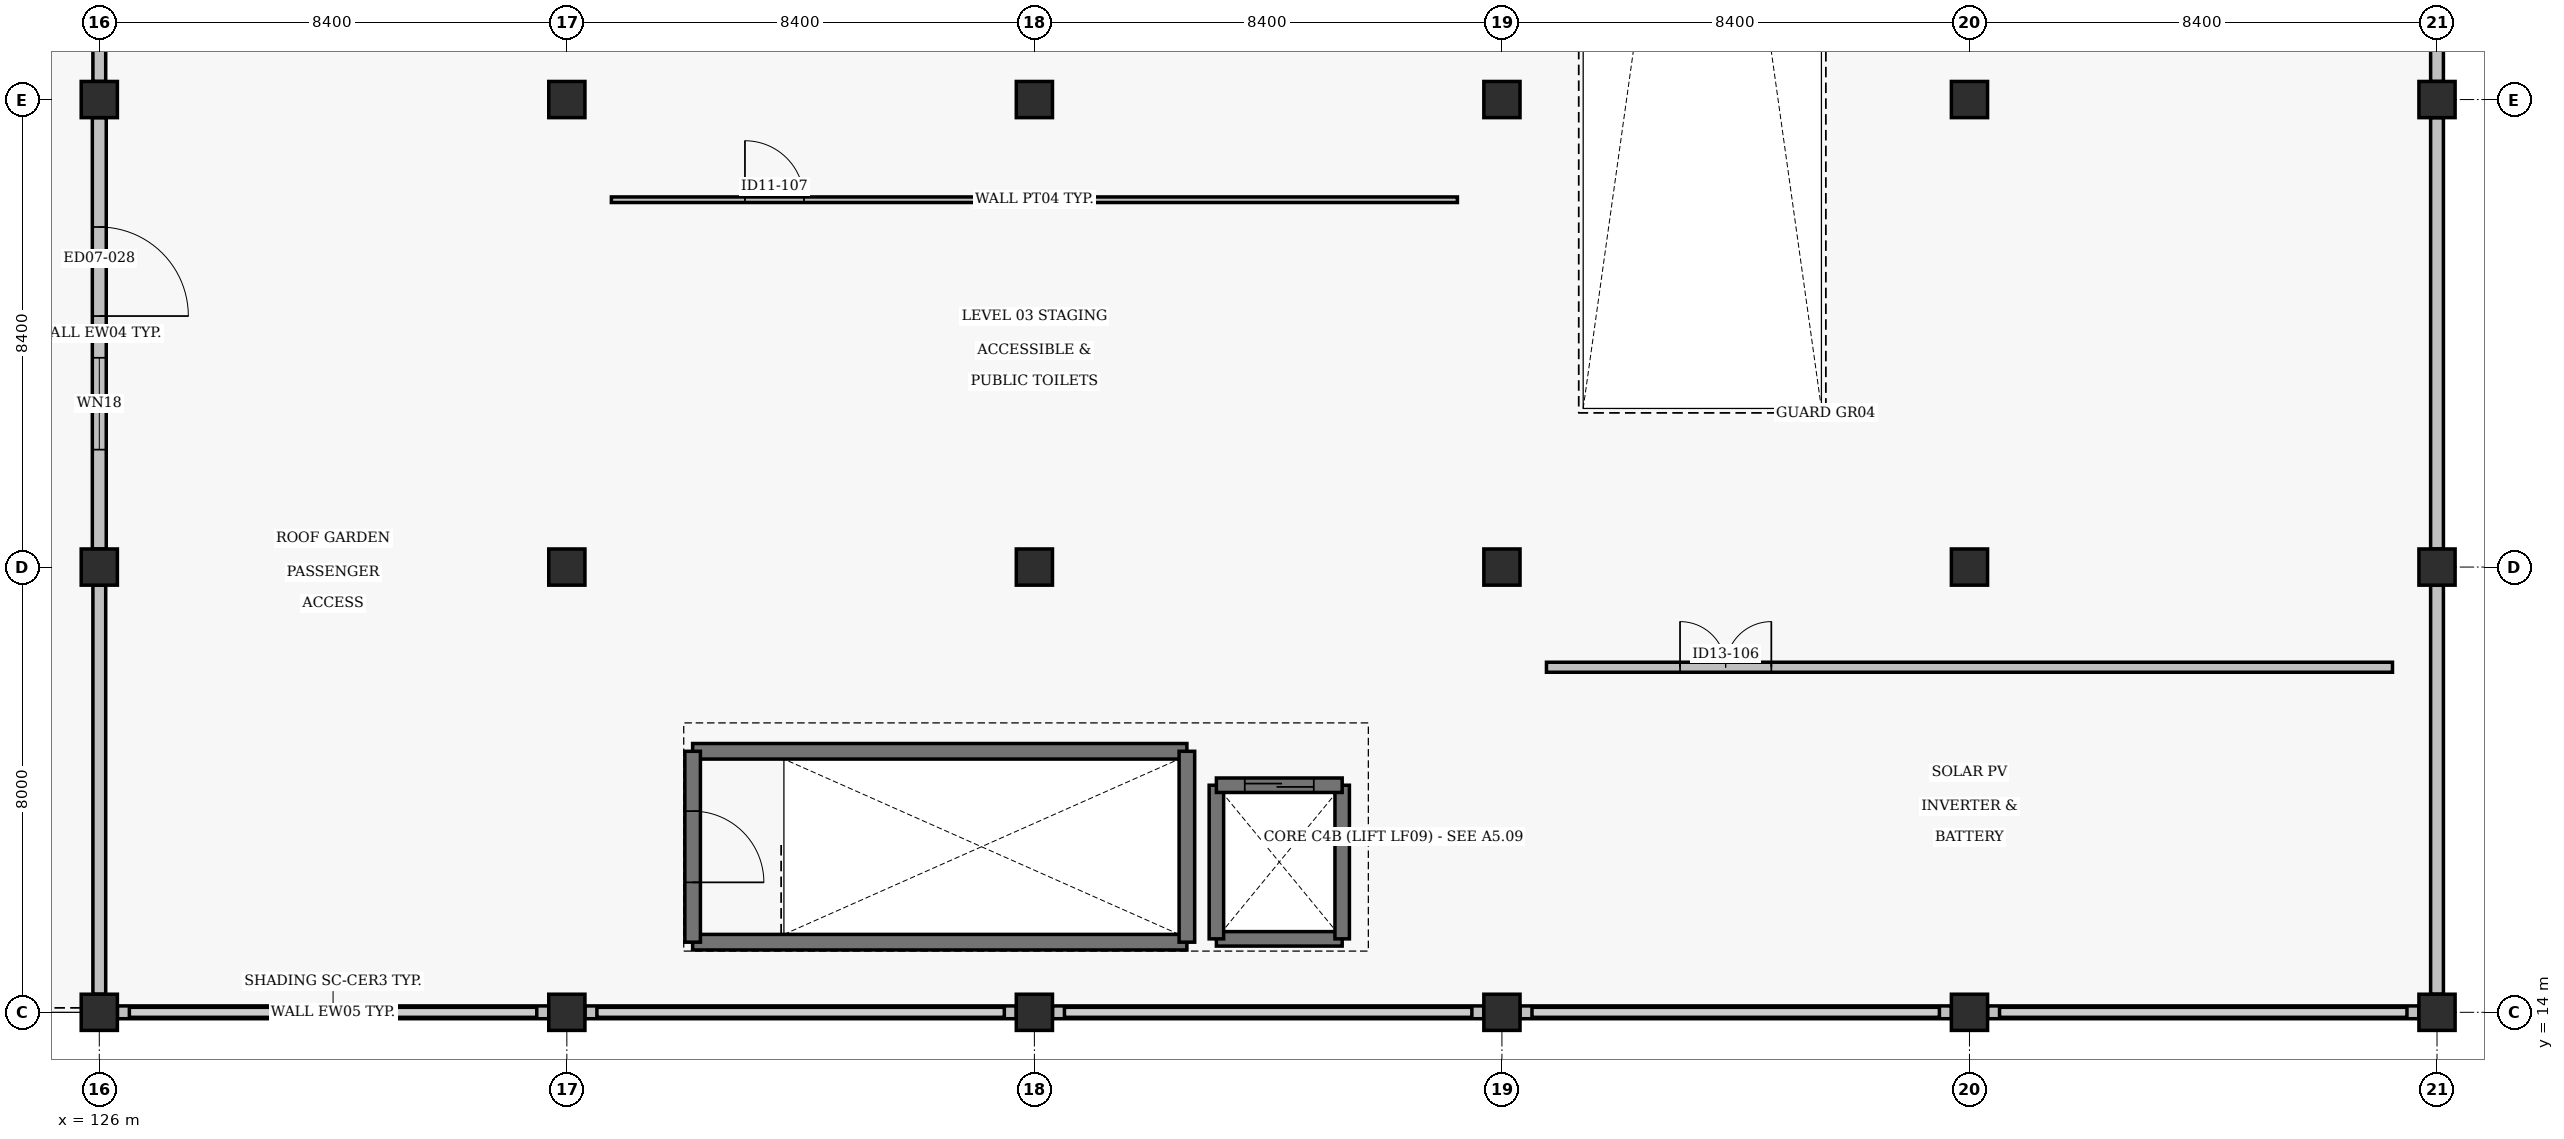
"""IFC4 building model, lengths in metres.
Left out: names, types, materials, properties, quantities, classifications, styles, units other than length and angle.
Written with IfcOpenShell. Run it as: python <this file> out.ifc"""

import sys

from ifc_helpers import new_model, si_unit, direction, frame, frame_2d, origin, origin_2d, place, context, subcontext, project, spatial, rectangle, extrude, element, fill, save


model = new_model("IFC4")
c1 = context("Model", 3, precision=1e-05, world=origin(), true_north=direction((0.0, 1.0)))
c2 = subcontext(c1, "Body", "Model", "MODEL_VIEW")
j1 = project(units=[si_unit("LENGTHUNIT", "METRE"), si_unit("PLANEANGLEUNIT", "RADIAN")], contexts=[c1])
p1 = place(None, origin())
s1 = spatial("IfcSite", under=j1, at=p1, CompositionType="ELEMENT")
p2 = place(p1, origin())
s2 = spatial("IfcBuilding", under=s1, at=p2, CompositionType="ELEMENT")
p3 = place(p2, frame((0.0, 0.0, 13.12)))
s3 = spatial("IfcBuildingStorey", under=s2, at=p3, CompositionType="ELEMENT", Elevation=13.12)
for number, where, z_axis, x_axis in (
    (1, (126.0, 14.0, 0.0), (0.0, 0.0, 1.0), (1.0, 0.0, 0.0)),
    (2, (126.0, 22.0, 0.0), (0.0, 0.0, 1.0), (1.0, 0.0, 0.0)),
    (3, (126.0, 30.4, 0.0), (0.0, 0.0, 1.0), (1.0, 0.0, 0.0)),
    (4, (134.4, 14.0, 0.0), (0.0, 0.0, 1.0), (1.0, 0.0, 0.0)),
    (5, (134.4, 22.0, 0.0), (0.0, 0.0, 1.0), (1.0, 0.0, 0.0)),
    (6, (134.4, 30.4, 0.0), (0.0, 0.0, 1.0), (1.0, 0.0, 0.0)),
    (7, (142.8, 14.0, 0.0), (0.0, 0.0, 1.0), (1.0, 0.0, 0.0)),
    (8, (142.8, 22.0, 0.0), (0.0, 0.0, 1.0), (1.0, 0.0, 0.0)),
    (9, (142.8, 30.4, 0.0), (0.0, 0.0, 1.0), (1.0, 0.0, 0.0)),
    (10, (151.2, 14.0, 0.0), (0.0, 0.0, 1.0), (1.0, 0.0, 0.0)),
    (11, (151.2, 22.0, 0.0), (0.0, 0.0, 1.0), (1.0, 0.0, 0.0)),
    (12, (151.2, 30.4, 0.0), (0.0, 0.0, 1.0), (1.0, 0.0, 0.0)),
    (13, (159.6, 14.0, 0.0), (0.0, 0.0, 1.0), (1.0, 0.0, 0.0)),
    (14, (159.6, 22.0, 0.0), (0.0, 0.0, 1.0), (1.0, 0.0, 0.0)),
    (15, (159.6, 30.4, 0.0), (0.0, 0.0, 1.0), (1.0, 0.0, 0.0)),
    (16, (168.0, 14.0, 0.0), (0.0, 0.0, 1.0), (1.0, 0.0, 0.0)),
    (17, (168.0, 22.0, 0.0), (0.0, 0.0, 1.0), (1.0, 0.0, 0.0)),
    (18, (168.0, 30.4, 0.0), (0.0, 0.0, 1.0), (1.0, 0.0, 0.0)),
):
    element("IfcColumn", number, at=place(p3, frame(where, z_axis=z_axis, x_axis=x_axis)), inside=s3, PredefinedType="COLUMN", context=c2, shape_type="SweptSolid", body=[
        extrude(rectangle(XDim=0.65, YDim=0.65, at=origin_2d()), origin(), (0.0, 0.0, 1.0), 3.2),
    ])
p4 = place(p3, frame((126.0, 30.075, 0.0), z_axis=(0.0, 0.0, 1.0), x_axis=(0.0, -1.0, 0.0)))
e19 = element("IfcWall", 19, at=p4, inside=s3, PredefinedType="SOLIDWALL", context=c2, shape_type="SweptSolid", body=[
    extrude(rectangle(XDim=7.75, YDim=0.25, at=frame_2d((3.875, 0.0))), origin(), (0.0, 0.0, 1.0), 2.325),
])
p5 = place(p4, frame((1.965, 0.0, 0.0)))
e20 = element("IfcOpeningElement", 20, at=p5, cuts=e19, PredefinedType="OPENING", context=c2, shape_type="SweptSolid", body=[
    extrude(rectangle(XDim=1.6, YDim=2.1, at=frame_2d((0.8, 1.05))), frame((0.0, 0.135, 0.0), z_axis=(0.0, -1.0, 0.0), x_axis=(1.0, 0.0, 0.0)), (0.0, 0.0, 1.0), 0.27),
])
p6 = place(p4, frame((4.315, 0.0, 0.85)))
e21 = element("IfcOpeningElement", 21, at=p6, cuts=e19, PredefinedType="OPENING", context=c2, shape_type="SweptSolid", body=[
    extrude(rectangle(XDim=1.65, YDim=1.4, at=frame_2d((0.825, 0.7))), frame((0.0, 0.135, 0.0), z_axis=(0.0, -1.0, 0.0), x_axis=(1.0, 0.0, 0.0)), (0.0, 0.0, 1.0), 0.27),
])
for number, where, z_axis, x_axis in (
    (22, (126.325, 14.0, 0.0), (0.0, 0.0, 1.0), (1.0, 0.0, 0.0)),
    (23, (134.725, 14.0, 0.0), (0.0, 0.0, 1.0), (1.0, 0.0, 0.0)),
    (24, (143.125, 14.0, 0.0), (0.0, 0.0, 1.0), (1.0, 0.0, 0.0)),
    (25, (151.525, 14.0, 0.0), (0.0, 0.0, 1.0), (1.0, 0.0, 0.0)),
    (26, (159.925, 14.0, 0.0), (0.0, 0.0, 1.0), (1.0, 0.0, 0.0)),
):
    element("IfcWall", number, at=place(p3, frame(where, z_axis=z_axis, x_axis=x_axis)), inside=s3, PredefinedType="PARAPET", context=c2, shape_type="SweptSolid", body=[
        extrude(rectangle(XDim=7.75, YDim=0.23, at=frame_2d((3.875, 0.0))), origin(), (0.0, 0.0, 1.0), 1.15),
    ])
for number, where, z_axis, x_axis in (
    (27, (126.0, 14.325, 0.0), (0.0, 0.0, 1.0), (0.0, 1.0, 0.0)),
    (28, (168.0, 14.325, 0.0), (0.0, 0.0, 1.0), (0.0, 1.0, 0.0)),
):
    element("IfcWall", number, at=place(p3, frame(where, z_axis=z_axis, x_axis=x_axis)), inside=s3, PredefinedType="PARAPET", context=c2, shape_type="SweptSolid", body=[
        extrude(rectangle(XDim=7.35, YDim=0.23, at=frame_2d((3.675, 0.0))), origin(), (0.0, 0.0, 1.0), 1.15),
    ])
for number, where, z_axis, x_axis in (
    (29, (168.0, 22.325, 0.0), (0.0, 0.0, 1.0), (0.0, 1.0, 0.0)),
    (30, (126.0, 30.725, 0.0), (0.0, 0.0, 1.0), (0.0, 1.0, 0.0)),
    (31, (168.0, 30.725, 0.0), (0.0, 0.0, 1.0), (0.0, 1.0, 0.0)),
):
    element("IfcWall", number, at=place(p3, frame(where, z_axis=z_axis, x_axis=x_axis)), inside=s3, PredefinedType="PARAPET", context=c2, shape_type="SweptSolid", body=[
        extrude(rectangle(XDim=7.75, YDim=0.23, at=frame_2d((3.875, 0.0))), origin(), (0.0, 0.0, 1.0), 1.15),
    ])
for number, where, z_axis, x_axis in (
    (32, (136.66, 15.26, 0.0), (0.0, 0.0, 1.0), (1.0, 0.0, 0.0)),
    (33, (136.66, 18.69, 0.0), (0.0, 0.0, 1.0), (1.0, 0.0, 0.0)),
):
    element("IfcWall", number, at=place(p3, frame(where, z_axis=z_axis, x_axis=x_axis)), inside=s3, PredefinedType="SHEAR", context=c2, shape_type="SweptSolid", body=[
        extrude(rectangle(XDim=8.88, YDim=0.28, at=frame_2d((4.44, 0.0))), origin(), (0.0, 0.0, 1.0), 3.2),
    ])
p7 = place(p3, frame((136.66, 18.69, 0.0), z_axis=(0.0, 0.0, 1.0), x_axis=(0.0, -1.0, 0.0)))
e34 = element("IfcWall", 34, at=p7, inside=s3, PredefinedType="SHEAR", context=c2, shape_type="SweptSolid", body=[
    extrude(rectangle(XDim=3.43, YDim=0.28, at=frame_2d((1.715, 0.0))), origin(), (0.0, 0.0, 1.0), 3.2),
])
p8 = place(p7, frame((1.075, 0.0, 0.0)))
e35 = element("IfcOpeningElement", 35, at=p8, cuts=e34, PredefinedType="OPENING", context=c2, shape_type="SweptSolid", body=[
    extrude(rectangle(XDim=1.28, YDim=2.1, at=frame_2d((0.64, 1.05))), frame((0.0, 0.15, 0.0), z_axis=(0.0, -1.0, 0.0), x_axis=(1.0, 0.0, 0.0)), (0.0, 0.0, 1.0), 0.3),
])
p9 = place(p3, frame((145.54, 15.26, 0.0), z_axis=(0.0, 0.0, 1.0), x_axis=(0.0, 1.0, 0.0)))
e36 = element("IfcWall", 36, at=p9, inside=s3, PredefinedType="SHEAR", context=c2, shape_type="SweptSolid", body=[
    extrude(rectangle(XDim=3.43, YDim=0.28, at=frame_2d((1.715, 0.0))), origin(), (0.0, 0.0, 1.0), 3.2),
])
p10 = place(p3, frame((146.07, 15.32, 0.0), z_axis=(0.0, 0.0, 1.0), x_axis=(1.0, 0.0, 0.0)))
e37 = element("IfcWall", 37, at=p10, inside=s3, PredefinedType="SHEAR", context=c2, shape_type="SweptSolid", body=[
    extrude(rectangle(XDim=2.26, YDim=0.26, at=frame_2d((1.13, 0.0))), origin(), (0.0, 0.0, 1.0), 3.2),
])
for number, where, z_axis, x_axis in (
    (38, (148.33, 15.32, 0.0), (0.0, 0.0, 1.0), (0.0, 1.0, 0.0)),
    (39, (146.07, 18.08, 0.0), (0.0, 0.0, 1.0), (0.0, -1.0, 0.0)),
):
    element("IfcWall", number, at=place(p3, frame(where, z_axis=z_axis, x_axis=x_axis)), inside=s3, PredefinedType="SHEAR", context=c2, shape_type="SweptSolid", body=[
        extrude(rectangle(XDim=2.76, YDim=0.26, at=frame_2d((1.38, 0.0))), origin(), (0.0, 0.0, 1.0), 3.2),
    ])
p11 = place(p3, frame((146.07, 18.08, 0.0), z_axis=(0.0, 0.0, 1.0), x_axis=(1.0, 0.0, 0.0)))
e40 = element("IfcWall", 40, at=p11, inside=s3, PredefinedType="SHEAR", context=c2, shape_type="SweptSolid", body=[
    extrude(rectangle(XDim=2.26, YDim=0.26, at=frame_2d((1.13, 0.0))), origin(), (0.0, 0.0, 1.0), 3.2),
])
p12 = place(p11, frame((0.51, 0.0, 0.0)))
e41 = element("IfcOpeningElement", 41, at=p12, cuts=e40, PredefinedType="OPENING", context=c2, shape_type="SweptSolid", body=[
    extrude(rectangle(XDim=1.24, YDim=2.14, at=frame_2d((0.62, 1.07))), frame((0.0, 0.14, 0.0), z_axis=(0.0, -1.0, 0.0), x_axis=(1.0, 0.0, 0.0)), (0.0, 0.0, 1.0), 0.28),
])
p13 = place(p3, frame((152.0, 20.2, 0.0), z_axis=(0.0, 0.0, 1.0), x_axis=(1.0, 0.0, 0.0)))
e42 = element("IfcWall", 42, at=p13, inside=s3, PredefinedType="SOLIDWALL", context=c2, shape_type="SweptSolid", body=[
    extrude(rectangle(XDim=15.2, YDim=0.18, at=frame_2d((7.6, 0.0))), origin(), (0.0, 0.0, 1.0), 2.375),
])
p14 = place(p13, frame((2.4, 0.0, 0.0)))
e43 = element("IfcOpeningElement", 43, at=p14, cuts=e42, PredefinedType="OPENING", context=c2, shape_type="SweptSolid", body=[
    extrude(rectangle(XDim=1.64, YDim=2.16, at=frame_2d((0.82, 1.08))), frame((0.0, 0.1, 0.0), z_axis=(0.0, -1.0, 0.0), x_axis=(1.0, 0.0, 0.0)), (0.0, 0.0, 1.0), 0.2),
])
p15 = place(p3, frame((135.2, 28.6, 0.0), z_axis=(0.0, 0.0, 1.0), x_axis=(1.0, 0.0, 0.0)))
e44 = element("IfcWall", 44, at=p15, inside=s3, PredefinedType="PARTITIONING", context=c2, shape_type="SweptSolid", body=[
    extrude(rectangle(XDim=15.2, YDim=0.1, at=frame_2d((7.6, 0.0))), origin(), (0.0, 0.0, 1.0), 2.375),
])
p16 = place(p15, frame((2.4, 0.0, 0.0)))
e45 = element("IfcOpeningElement", 45, at=p16, cuts=e44, PredefinedType="OPENING", context=c2, shape_type="SweptSolid", body=[
    extrude(rectangle(XDim=1.06, YDim=2.1, at=frame_2d((0.53, 1.05))), frame((0.0, 0.06, 0.0), z_axis=(0.0, -1.0, 0.0), x_axis=(1.0, 0.0, 0.0)), (0.0, 0.0, 1.0), 0.12),
])
p17 = place(p5, origin())
e46 = element("IfcDoor", 46, at=p17, inside=s3, OperationType="SINGLE_SWING_RIGHT", PredefinedType="DOOR", context=c2, shape_type="SweptSolid", body=[
    extrude(rectangle(XDim=1.6, YDim=2.1, at=frame_2d((0.8, 1.05))), frame((0.0, 0.025, 0.0), z_axis=(0.0, -1.0, 0.0), x_axis=(1.0, 0.0, 0.0)), (0.0, 0.0, 1.0), 0.05),
])
fill(e20, e46)
p18 = place(p6, origin())
e47 = element("IfcWindow", 47, at=p18, inside=s3, PartitioningType="DOUBLE_PANEL_VERTICAL", PredefinedType="WINDOW", context=c2, shape_type="SweptSolid", body=[
    extrude(rectangle(XDim=1.65, YDim=1.4, at=frame_2d((0.825, 0.7))), frame((0.0, 0.03, 0.0), z_axis=(0.0, -1.0, 0.0), x_axis=(1.0, 0.0, 0.0)), (0.0, 0.0, 1.0), 0.06),
])
fill(e21, e47)
p19 = place(p8, origin())
e48 = element("IfcDoor", 48, at=p19, inside=s3, OperationType="SINGLE_SWING_RIGHT", PredefinedType="DOOR", context=c2, shape_type="SweptSolid", body=[
    extrude(rectangle(XDim=1.28, YDim=2.1, at=frame_2d((0.64, 1.05))), frame((0.0, 0.025, 0.0), z_axis=(0.0, -1.0, 0.0), x_axis=(1.0, 0.0, 0.0)), (0.0, 0.0, 1.0), 0.05),
])
fill(e35, e48)
p20 = place(p12, origin())
e49 = element("IfcDoor", 49, at=p20, inside=s3, OperationType="DOUBLE_DOOR_SLIDING", PredefinedType="DOOR", context=c2, shape_type="SweptSolid", body=[
    extrude(rectangle(XDim=1.24, YDim=2.14, at=frame_2d((0.62, 1.07))), frame((0.0, 0.025, 0.0), z_axis=(0.0, -1.0, 0.0), x_axis=(1.0, 0.0, 0.0)), (0.0, 0.0, 1.0), 0.05),
])
fill(e41, e49)
p21 = place(p14, origin())
e50 = element("IfcDoor", 50, at=p21, inside=s3, OperationType="DOUBLE_DOOR_SINGLE_SWING", PredefinedType="DOOR", context=c2, shape_type="SweptSolid", body=[
    extrude(rectangle(XDim=1.64, YDim=2.16, at=frame_2d((0.82, 1.08))), frame((0.0, 0.025, 0.0), z_axis=(0.0, -1.0, 0.0), x_axis=(1.0, 0.0, 0.0)), (0.0, 0.0, 1.0), 0.05),
])
fill(e43, e50)
p22 = place(p16, origin())
e51 = element("IfcDoor", 51, at=p22, inside=s3, OperationType="SINGLE_SWING_LEFT", PredefinedType="DOOR", context=c2, shape_type="SweptSolid", body=[
    extrude(rectangle(XDim=1.06, YDim=2.1, at=frame_2d((0.53, 1.05))), frame((0.0, 0.025, 0.0), z_axis=(0.0, -1.0, 0.0), x_axis=(1.0, 0.0, 0.0)), (0.0, 0.0, 1.0), 0.05),
])
fill(e45, e51)
save(model, sys.argv[1])
